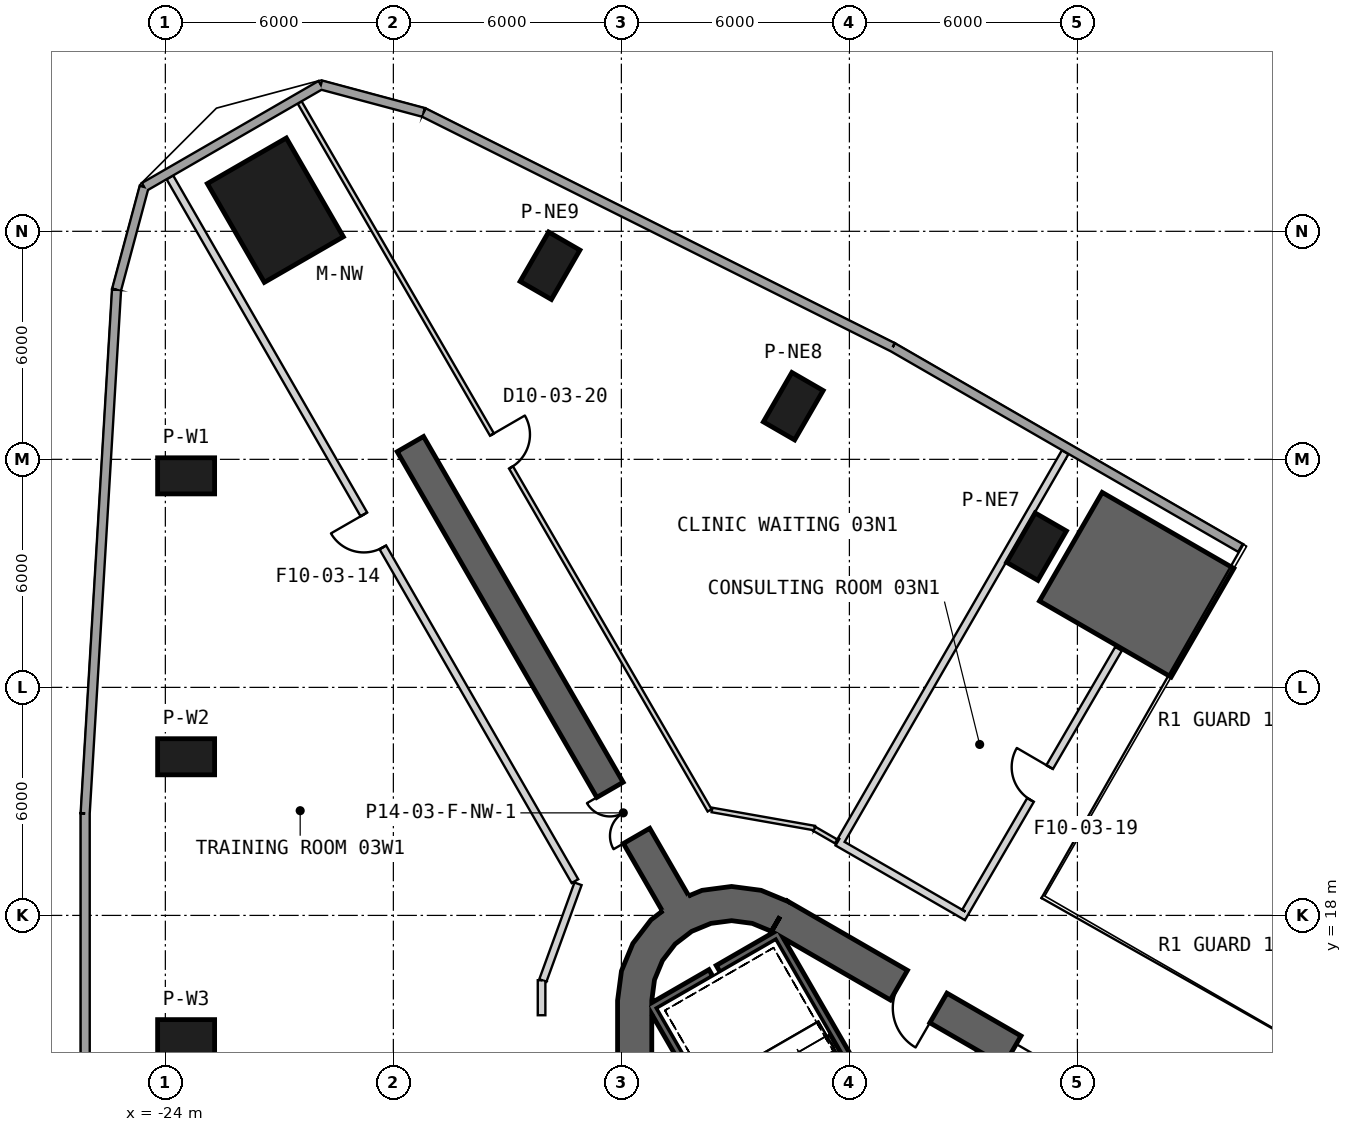
"""IFC4 building model, lengths in metres.
Left out: names, types, materials, properties, quantities, classifications, styles, units other than length and angle.
Written with IfcOpenShell. Run it as: python <this file> out.ifc"""

import sys

from ifc_helpers import new_model, si_unit, direction, frame, frame_2d, origin, origin_2d, place, context, subcontext, project, spatial, polyline, rectangle, outline, extrude, element, fill, save


model = new_model("IFC4")
c1 = context("Model", 3, precision=1e-05, world=origin(), true_north=direction((0.0, 1.0)))
c2 = subcontext(c1, "Body", "Model", "MODEL_VIEW")
j1 = project(units=[si_unit("LENGTHUNIT", "METRE"), si_unit("PLANEANGLEUNIT", "RADIAN")], contexts=[c1])
p1 = place(None, origin())
s1 = spatial("IfcSite", under=j1, at=p1, CompositionType="ELEMENT")
p2 = place(p1, origin())
s2 = spatial("IfcBuilding", under=s1, at=p2, CompositionType="ELEMENT")
p3 = place(p2, frame((0.0, 0.0, 21.5)))
s3 = spatial("IfcBuildingStorey", under=s2, at=p3, CompositionType="ELEMENT", Elevation=21.5)
p4 = place(p3, frame((-21.106, 36.556, 0.0), z_axis=(0.0, 0.0, 1.0), x_axis=(-0.5, 0.866025403784, 0.0)))
e1 = element("IfcColumn", 1, at=p4, inside=s3, PredefinedType="COLUMN", context=c2, shape_type="SweptSolid", body=[
    extrude(rectangle(XDim=3.0, YDim=2.4, at=origin_2d()), origin(), (0.0, 0.0, 1.0), 6.0),
])
for number, where, z_axis, x_axis in (
    (2, (-23.453, 29.566, 0.0), (0.0, 0.0, 1.0), (-1.0, 0.0, 0.0)),
    (3, (-23.453, 22.174, 0.0), (0.0, 0.0, 1.0), (-1.0, 0.0, 0.0)),
    (4, (-23.453, 14.783, 0.0), (0.0, 0.0, 1.0), (-1.0, 0.0, 0.0)),
    (5, (-1.076, 27.703, 0.0), (0.0, 0.0, 1.0), (0.5, 0.866, 0.0)),
    (6, (-7.477, 31.398, 0.0), (0.0, 0.0, 1.0), (0.5, 0.866, 0.0)),
    (7, (-13.878, 35.094, 0.0), (0.0, 0.0, 1.0), (0.5, 0.866, 0.0)),
):
    element("IfcColumn", number, at=place(p3, frame(where, z_axis=z_axis, x_axis=x_axis)), inside=s3, PredefinedType="COLUMN", context=c2, shape_type="SweptSolid", body=[
        extrude(rectangle(XDim=1.5, YDim=0.95, at=origin_2d()), origin(), (0.0, 0.0, 1.0), 6.0),
    ])
p5 = place(p3, frame((19.475, 2.208, 0.0), z_axis=(0.0, 0.0, 1.0), x_axis=(-0.866028369851, 0.499994862586, 0.0)))
e8 = element("IfcWall", 8, at=p5, inside=s3, PredefinedType="SHEAR", context=c2, shape_type="SweptSolid", body=[
    extrude(rectangle(XDim=31.523, YDim=0.9, at=frame_2d((15.762, 0.0))), origin(), (0.0, 0.0, 1.0), 6.0),
])
p6 = place(p5, frame((7.062, 0.0, 0.0)))
e9 = element("IfcOpeningElement", 9, at=p6, cuts=e8, PredefinedType="OPENING", context=c2, shape_type="SweptSolid", body=[
    extrude(rectangle(XDim=1.2, YDim=2.4, at=frame_2d((0.6, 1.2))), frame((0.0, 0.46, 0.0), z_axis=(0.0, -1.0, 0.0), x_axis=(1.0, 0.0, 0.0)), (0.0, 0.0, 1.0), 0.92),
])
p7 = place(p5, frame((9.762, 0.0, 0.0)))
e10 = element("IfcOpeningElement", 10, at=p7, cuts=e8, PredefinedType="OPENING", context=c2, shape_type="SweptSolid", body=[
    extrude(rectangle(XDim=1.2, YDim=2.4, at=frame_2d((0.6, 1.2))), frame((0.0, 0.46, 0.0), z_axis=(0.0, -1.0, 0.0), x_axis=(1.0, 0.0, 0.0)), (0.0, 0.0, 1.0), 0.92),
])
p8 = place(p5, frame((12.462, 0.0, 0.0)))
e11 = element("IfcOpeningElement", 11, at=p8, cuts=e8, PredefinedType="OPENING", context=c2, shape_type="SweptSolid", body=[
    extrude(rectangle(XDim=1.2, YDim=2.4, at=frame_2d((0.6, 1.2))), frame((0.0, 0.46, 0.0), z_axis=(0.0, -1.0, 0.0), x_axis=(1.0, 0.0, 0.0)), (0.0, 0.0, 1.0), 0.92),
])
p9 = place(p5, frame((15.162, 0.0, 0.0)))
e12 = element("IfcOpeningElement", 12, at=p9, cuts=e8, PredefinedType="OPENING", context=c2, shape_type="SweptSolid", body=[
    extrude(rectangle(XDim=1.2, YDim=2.4, at=frame_2d((0.6, 1.2))), frame((0.0, 0.46, 0.0), z_axis=(0.0, -1.0, 0.0), x_axis=(1.0, 0.0, 0.0)), (0.0, 0.0, 1.0), 0.92),
])
p10 = place(p5, frame((17.862, 0.0, 0.0)))
e13 = element("IfcOpeningElement", 13, at=p10, cuts=e8, PredefinedType="OPENING", context=c2, shape_type="SweptSolid", body=[
    extrude(rectangle(XDim=1.2, YDim=2.4, at=frame_2d((0.6, 1.2))), frame((0.0, 0.46, 0.0), z_axis=(0.0, -1.0, 0.0), x_axis=(1.0, 0.0, 0.0)), (0.0, 0.0, 1.0), 0.92),
])
p11 = place(p5, frame((20.562, 0.0, 0.0)))
e14 = element("IfcOpeningElement", 14, at=p11, cuts=e8, PredefinedType="OPENING", context=c2, shape_type="SweptSolid", body=[
    extrude(rectangle(XDim=1.2, YDim=2.4, at=frame_2d((0.6, 1.2))), frame((0.0, 0.46, 0.0), z_axis=(0.0, -1.0, 0.0), x_axis=(1.0, 0.0, 0.0)), (0.0, 0.0, 1.0), 0.92),
])
p12 = place(p5, frame((23.262, 0.0, 0.0)))
e15 = element("IfcOpeningElement", 15, at=p12, cuts=e8, PredefinedType="OPENING", context=c2, shape_type="SweptSolid", body=[
    extrude(rectangle(XDim=1.2, YDim=2.4, at=frame_2d((0.6, 1.2))), frame((0.0, 0.46, 0.0), z_axis=(0.0, -1.0, 0.0), x_axis=(1.0, 0.0, 0.0)), (0.0, 0.0, 1.0), 0.92),
])
p13 = place(p5, frame((3.612, 0.0, 0.0)))
e16 = element("IfcOpeningElement", 16, at=p13, cuts=e8, PredefinedType="OPENING", context=c2, shape_type="SweptSolid", body=[
    extrude(rectangle(XDim=1.2, YDim=2.4, at=frame_2d((0.6, 1.2))), frame((0.0, 0.46, 0.0), z_axis=(0.0, -1.0, 0.0), x_axis=(1.0, 0.0, 0.0)), (0.0, 0.0, 1.0), 0.92),
])
p14 = place(p5, frame((26.712, 0.0, 0.0)))
e17 = element("IfcOpeningElement", 17, at=p14, cuts=e8, PredefinedType="OPENING", context=c2, shape_type="SweptSolid", body=[
    extrude(rectangle(XDim=1.2, YDim=2.4, at=frame_2d((0.6, 1.2))), frame((0.0, 0.46, 0.0), z_axis=(0.0, -1.0, 0.0), x_axis=(1.0, 0.0, 0.0)), (0.0, 0.0, 1.0), 0.92),
])
p15 = place(p3, frame((-11.65, 15.762, 0.0), z_axis=(0.0, 0.0, 1.0), x_axis=(0.0, -1.0, 0.0)))
e18 = element("IfcWall", 18, at=p15, inside=s3, PredefinedType="SHEAR", context=c2, shape_type="SweptSolid", body=[
    extrude(rectangle(XDim=31.523, YDim=0.9, at=frame_2d((15.762, 0.0))), origin(), (0.0, 0.0, 1.0), 6.0),
])
p16 = place(p15, frame((7.062, 0.0, 0.0)))
e19 = element("IfcOpeningElement", 19, at=p16, cuts=e18, PredefinedType="OPENING", context=c2, shape_type="SweptSolid", body=[
    extrude(rectangle(XDim=1.2, YDim=2.4, at=frame_2d((0.6, 1.2))), frame((0.0, 0.46, 0.0), z_axis=(0.0, -1.0, 0.0), x_axis=(1.0, 0.0, 0.0)), (0.0, 0.0, 1.0), 0.92),
])
p17 = place(p15, frame((9.762, 0.0, 0.0)))
e20 = element("IfcOpeningElement", 20, at=p17, cuts=e18, PredefinedType="OPENING", context=c2, shape_type="SweptSolid", body=[
    extrude(rectangle(XDim=1.2, YDim=2.4, at=frame_2d((0.6, 1.2))), frame((0.0, 0.46, 0.0), z_axis=(0.0, -1.0, 0.0), x_axis=(1.0, 0.0, 0.0)), (0.0, 0.0, 1.0), 0.92),
])
p18 = place(p15, frame((12.462, 0.0, 0.0)))
e21 = element("IfcOpeningElement", 21, at=p18, cuts=e18, PredefinedType="OPENING", context=c2, shape_type="SweptSolid", body=[
    extrude(rectangle(XDim=1.2, YDim=2.4, at=frame_2d((0.6, 1.2))), frame((0.0, 0.46, 0.0), z_axis=(0.0, -1.0, 0.0), x_axis=(1.0, 0.0, 0.0)), (0.0, 0.0, 1.0), 0.92),
])
p19 = place(p15, frame((15.162, 0.0, 0.0)))
e22 = element("IfcOpeningElement", 22, at=p19, cuts=e18, PredefinedType="OPENING", context=c2, shape_type="SweptSolid", body=[
    extrude(rectangle(XDim=1.2, YDim=2.4, at=frame_2d((0.6, 1.2))), frame((0.0, 0.46, 0.0), z_axis=(0.0, -1.0, 0.0), x_axis=(1.0, 0.0, 0.0)), (0.0, 0.0, 1.0), 0.92),
])
p20 = place(p15, frame((17.862, 0.0, 0.0)))
e23 = element("IfcOpeningElement", 23, at=p20, cuts=e18, PredefinedType="OPENING", context=c2, shape_type="SweptSolid", body=[
    extrude(rectangle(XDim=1.2, YDim=2.4, at=frame_2d((0.6, 1.2))), frame((0.0, 0.46, 0.0), z_axis=(0.0, -1.0, 0.0), x_axis=(1.0, 0.0, 0.0)), (0.0, 0.0, 1.0), 0.92),
])
p21 = place(p15, frame((20.562, 0.0, 0.0)))
e24 = element("IfcOpeningElement", 24, at=p21, cuts=e18, PredefinedType="OPENING", context=c2, shape_type="SweptSolid", body=[
    extrude(rectangle(XDim=1.2, YDim=2.4, at=frame_2d((0.6, 1.2))), frame((0.0, 0.46, 0.0), z_axis=(0.0, -1.0, 0.0), x_axis=(1.0, 0.0, 0.0)), (0.0, 0.0, 1.0), 0.92),
])
p22 = place(p15, frame((23.262, 0.0, 0.0)))
e25 = element("IfcOpeningElement", 25, at=p22, cuts=e18, PredefinedType="OPENING", context=c2, shape_type="SweptSolid", body=[
    extrude(rectangle(XDim=1.2, YDim=2.4, at=frame_2d((0.6, 1.2))), frame((0.0, 0.46, 0.0), z_axis=(0.0, -1.0, 0.0), x_axis=(1.0, 0.0, 0.0)), (0.0, 0.0, 1.0), 0.92),
])
p23 = place(p15, frame((3.612, 0.0, 0.0)))
e26 = element("IfcOpeningElement", 26, at=p23, cuts=e18, PredefinedType="OPENING", context=c2, shape_type="SweptSolid", body=[
    extrude(rectangle(XDim=1.2, YDim=2.4, at=frame_2d((0.6, 1.2))), frame((0.0, 0.46, 0.0), z_axis=(0.0, -1.0, 0.0), x_axis=(1.0, 0.0, 0.0)), (0.0, 0.0, 1.0), 0.92),
])
p24 = place(p15, frame((26.712, 0.0, 0.0)))
e27 = element("IfcOpeningElement", 27, at=p24, cuts=e18, PredefinedType="OPENING", context=c2, shape_type="SweptSolid", body=[
    extrude(rectangle(XDim=1.2, YDim=2.4, at=frame_2d((0.6, 1.2))), frame((0.0, 0.46, 0.0), z_axis=(0.0, -1.0, 0.0), x_axis=(1.0, 0.0, 0.0)), (0.0, 0.0, 1.0), 0.92),
])
p25 = place(p3, origin())
e28 = element("IfcWall", 28, at=p25, inside=s3, PredefinedType="SHEAR", context=c2, shape_type="SweptSolid", body=[
    extrude(outline(polyline([(-7.6, 18.36), (-8.323, 18.659), (-9.1, 18.762), (-9.876, 18.659), (-10.6, 18.36), (-11.221, 17.883), (-11.698, 17.262), (-11.998, 16.538), (-12.1, 15.762), (-11.2, 15.762), (-11.128, 16.305), (-10.919, 16.812), (-10.585, 17.247), (-10.15, 17.58), (-9.644, 17.79), (-9.1, 17.862), (-8.556, 17.79), (-8.05, 17.58), (-7.6, 18.36)])), origin(), (0.0, 0.0, 1.0), 6.0),
])
p26 = place(p3, frame((-10.575, 18.316, 0.0), z_axis=(0.0, 0.0, 1.0), x_axis=(-0.499996575515, 0.866027380903, 0.0)))
e29 = element("IfcWall", 29, at=p26, inside=s3, PredefinedType="SHEAR", context=c2, shape_type="SweptSolid", body=[
    extrude(rectangle(XDim=13.954, YDim=0.8, at=frame_2d((6.977, 0.0))), origin(), (0.0, 0.0, 1.0), 6.0),
])
p27 = place(p26, frame((2.05, 0.0, 0.0)))
e30 = element("IfcOpeningElement", 30, at=p27, cuts=e29, PredefinedType="OPENING", context=c2, shape_type="SweptSolid", body=[
    extrude(rectangle(XDim=1.4, YDim=2.4, at=frame_2d((0.7, 1.2))), frame((0.0, 0.41, 0.0), z_axis=(0.0, -1.0, 0.0), x_axis=(1.0, 0.0, 0.0)), (0.0, 0.0, 1.0), 0.82),
])
p28 = place(p3, origin())
e31 = element("IfcWall", 31, at=p28, inside=s3, PredefinedType="SHEAR", context=c2, shape_type="SweptSolid", body=[
    extrude(outline(polyline([(4.116, 27.13), (0.652, 29.13), (-0.998, 26.272), (2.467, 24.272), (4.116, 27.13)])), origin(), (0.0, 0.0, 1.0), 6.0),
])
p29 = place(p3, frame((4.29, 27.67, 0.0), z_axis=(0.0, 0.0, 1.0), x_axis=(-0.866062075984, 0.499936476508, 0.0)))
e32 = element("IfcWall", 32, at=p29, inside=s3, PredefinedType="SOLIDWALL", context=c2, shape_type="SweptSolid", body=[
    extrude(rectangle(XDim=10.566, YDim=0.24, at=frame_2d((5.283, 0.0))), origin(), (0.0, 0.0, 1.0), 5.7),
])
p30 = place(p3, frame((-4.861, 32.952, 0.0), z_axis=(0.0, 0.0, 1.0), x_axis=(-0.894285628533, 0.447496608478, 0.0)))
e33 = element("IfcWall", 33, at=p30, inside=s3, PredefinedType="SOLIDWALL", context=c2, shape_type="SweptSolid", body=[
    extrude(rectangle(XDim=13.801, YDim=0.24, at=frame_2d((6.901, 0.0))), origin(), (0.0, 0.0, 1.0), 5.7),
])
p31 = place(p3, frame((-17.203, 39.128, 0.0), z_axis=(0.0, 0.0, 1.0), x_axis=(-0.965923146675, 0.25882904535, 0.0)))
e34 = element("IfcWall", 34, at=p31, inside=s3, PredefinedType="SOLIDWALL", context=c2, shape_type="SweptSolid", body=[
    extrude(rectangle(XDim=2.801, YDim=0.24, at=frame_2d((1.4, 0.0))), origin(), (0.0, 0.0, 1.0), 5.7),
])
p32 = place(p3, frame((-19.908, 39.853, 0.0), z_axis=(0.0, 0.0, 1.0), x_axis=(-0.866010734295, -0.500025407441, 0.0)))
e35 = element("IfcWall", 35, at=p32, inside=s3, PredefinedType="SOLIDWALL", context=c2, shape_type="SweptSolid", body=[
    extrude(rectangle(XDim=5.371, YDim=0.24, at=frame_2d((2.686, 0.0))), origin(), (0.0, 0.0, 1.0), 5.7),
])
p33 = place(p3, frame((-24.56, 37.167, 0.0), z_axis=(0.0, 0.0, 1.0), x_axis=(-0.258850842196, -0.965917305723, 0.0)))
e36 = element("IfcWall", 36, at=p33, inside=s3, PredefinedType="SOLIDWALL", context=c2, shape_type="SweptSolid", body=[
    extrude(rectangle(XDim=2.8, YDim=0.24, at=frame_2d((1.4, 0.0))), origin(), (0.0, 0.0, 1.0), 5.7),
])
p34 = place(p3, frame((-25.284, 34.462, 0.0), z_axis=(0.0, 0.0, 1.0), x_axis=(-0.059807686217, -0.998209918138, 0.0)))
e37 = element("IfcWall", 37, at=p34, inside=s3, PredefinedType="SOLIDWALL", context=c2, shape_type="SweptSolid", body=[
    extrude(rectangle(XDim=13.802, YDim=0.24, at=frame_2d((6.901, 0.0))), origin(), (0.0, 0.0, 1.0), 5.7),
])
p35 = place(p3, frame((-26.11, 20.685, 0.0), z_axis=(0.0, 0.0, 1.0), x_axis=(6.9319284e-05, -0.999999997597, 0.0)))
e38 = element("IfcWall", 38, at=p35, inside=s3, PredefinedType="SOLIDWALL", context=c2, shape_type="SweptSolid", body=[
    extrude(rectangle(XDim=10.566, YDim=0.24, at=frame_2d((5.283, 0.0))), origin(), (0.0, 0.0, 1.0), 5.7),
])
p36 = place(p3, frame((-4.158, 11.696, 0.0), z_axis=(0.0, 0.0, 1.0), x_axis=(0.508018930956, 0.861345903683, 0.0)))
e39 = element("IfcWall", 39, at=p36, inside=s3, PredefinedType="PLUMBINGWALL", context=c2, shape_type="SweptSolid", body=[
    extrude(rectangle(XDim=3.15, YDim=0.2, at=frame_2d((1.575, 0.0))), origin(), (0.0, 0.0, 1.0), 5.7),
])
p37 = place(p3, frame((-11.245, 15.678, -0.3), z_axis=(0.0, 0.0, 1.0), x_axis=(0.499977274689, -0.866038523851, 0.0)))
e40 = element("IfcWall", 40, at=p37, inside=s3, PredefinedType="SHEAR", context=c2, shape_type="SweptSolid", body=[
    extrude(rectangle(XDim=8.1, YDim=0.2, at=frame_2d((4.05, 0.0))), origin(), (0.0, 0.0, 1.0), 6.0),
])
p38 = place(p3, frame((-7.818, 17.541, -0.3), z_axis=(0.0, 0.0, 1.0), x_axis=(-0.866088799389, -0.499890179513, 0.0)))
e41 = element("IfcWall", 41, at=p38, inside=s3, PredefinedType="SHEAR", context=c2, shape_type="SweptSolid", body=[
    extrude(rectangle(XDim=1.89, YDim=0.2, at=frame_2d((0.945, 0.0))), origin(), (0.0, 0.0, 1.0), 6.0),
])
p39 = place(p3, frame((-9.645, 16.486, -0.3), z_axis=(0.0, 0.0, 1.0), x_axis=(-0.866038843867, -0.499976720371, 0.0)))
e42 = element("IfcWall", 42, at=p39, inside=s3, PredefinedType="SHEAR", context=c2, shape_type="SweptSolid", body=[
    extrude(rectangle(XDim=1.69, YDim=0.2, at=frame_2d((0.845, 0.0))), origin(), (0.0, 0.0, 1.0), 6.0),
])
p40 = place(p3, frame((-7.854, 17.405, -0.3), z_axis=(0.0, 0.0, 1.0), x_axis=(0.499997992926, -0.866026562566, 0.0)))
e43 = element("IfcWall", 43, at=p40, inside=s3, PredefinedType="SHEAR", context=c2, shape_type="SweptSolid", body=[
    extrude(rectangle(XDim=7.9, YDim=0.2, at=frame_2d((3.95, 0.0))), origin(), (0.0, 0.0, 1.0), 6.0),
])
p41 = place(p3, frame((-14.1, 16.294, 0.0), z_axis=(0.0, 0.0, 1.0), x_axis=(0.0, -1.0, 0.0)))
e44 = element("IfcWall", 44, at=p41, inside=s3, PredefinedType="PARTITIONING", context=c2, shape_type="SweptSolid", body=[
    extrude(rectangle(XDim=0.92, YDim=0.2, at=frame_2d((0.46, 0.0))), origin(), (0.0, 0.0, 1.0), 5.7),
])
p42 = place(p3, frame((-13.141, 18.831, 0.0), z_axis=(0.0, 0.0, 1.0), x_axis=(-0.34184444978, -0.939756549408, 0.0)))
e45 = element("IfcWall", 45, at=p42, inside=s3, PredefinedType="PARTITIONING", context=c2, shape_type="SweptSolid", body=[
    extrude(rectangle(XDim=2.707, YDim=0.2, at=frame_2d((1.354, 0.0))), origin(), (0.0, 0.0, 1.0), 4.78),
])
p43 = place(p3, frame((-13.222, 18.901, 0.0), z_axis=(0.0, 0.0, 1.0), x_axis=(-0.498838585436, 0.866694909227, 0.0)))
e46 = element("IfcWall", 46, at=p43, inside=s3, PredefinedType="PARTITIONING", context=c2, shape_type="SweptSolid", body=[
    extrude(rectangle(XDim=21.368, YDim=0.2, at=frame_2d((10.684, 0.0))), origin(), (0.0, 0.0, 1.0), 5.7),
])
p44 = place(p43, frame((10.134, 0.0, 0.0)))
e47 = element("IfcOpeningElement", 47, at=p44, cuts=e46, PredefinedType="OPENING", context=c2, shape_type="SweptSolid", body=[
    extrude(rectangle(XDim=1.0, YDim=2.1, at=frame_2d((0.5, 1.05))), frame((0.0, 0.11, 0.0), z_axis=(0.0, -1.0, 0.0), x_axis=(1.0, 0.0, 0.0)), (0.0, 0.0, 1.0), 0.22),
])
p45 = place(p3, frame((-2.909, 17.962, 0.0), z_axis=(0.0, 0.0, 1.0), x_axis=(-0.866156637233, 0.499772628079, 0.0)))
e48 = element("IfcWall", 48, at=p45, inside=s3, PredefinedType="PARTITIONING", context=c2, shape_type="SweptSolid", body=[
    extrude(rectangle(XDim=3.931, YDim=0.2, at=frame_2d((1.966, 0.0))), origin(), (0.0, 0.0, 1.0), 4.88),
])
p46 = place(p3, frame((-2.945, 18.098, 0.0), z_axis=(0.0, 0.0, 1.0), x_axis=(0.503235430028, 0.864149351654, 0.0)))
e49 = element("IfcWall", 49, at=p46, inside=s3, PredefinedType="PARTITIONING", context=c2, shape_type="SweptSolid", body=[
    extrude(rectangle(XDim=8.002, YDim=0.2, at=frame_2d((4.001, 0.0))), origin(), (0.0, 0.0, 1.0), 5.17),
])
p47 = place(p46, frame((3.402, 0.0, 0.0)))
e50 = element("IfcOpeningElement", 50, at=p47, cuts=e49, PredefinedType="OPENING", context=c2, shape_type="SweptSolid", body=[
    extrude(rectangle(XDim=1.0, YDim=2.1, at=frame_2d((0.5, 1.05))), frame((0.0, 0.11, 0.0), z_axis=(0.0, -1.0, 0.0), x_axis=(1.0, 0.0, 0.0)), (0.0, 0.0, 1.0), 0.22),
])
p48 = place(p3, frame((-20.467, 39.392, 0.0), z_axis=(0.0, 0.0, 1.0), x_axis=(0.501152950446, -0.865358723455, 0.0)))
e51 = element("IfcWall", 51, at=p48, inside=s3, PredefinedType="PARTITIONING", context=c2, shape_type="SweptSolid", body=[
    extrude(rectangle(XDim=21.527, YDim=0.12, at=frame_2d((10.763, 0.0))), origin(), (0.0, 0.0, 1.0), 5.7),
])
p49 = place(p48, frame((10.099, 0.0, 0.0)))
e52 = element("IfcOpeningElement", 52, at=p49, cuts=e51, PredefinedType="OPENING", context=c2, shape_type="SweptSolid", body=[
    extrude(rectangle(XDim=1.0, YDim=2.1, at=frame_2d((0.5, 1.05))), frame((0.0, 0.07, 0.0), z_axis=(0.0, -1.0, 0.0), x_axis=(1.0, 0.0, 0.0)), (0.0, 0.0, 1.0), 0.14),
])
p50 = place(p3, frame((-6.915, 20.297, 0.0), z_axis=(0.0, 0.0, 1.0), x_axis=(-0.984779973114, 0.173805651674, 0.0)))
e53 = element("IfcWall", 53, at=p50, inside=s3, PredefinedType="PARTITIONING", context=c2, shape_type="SweptSolid", body=[
    extrude(rectangle(XDim=2.742, YDim=0.12, at=frame_2d((1.371, 0.0))), origin(), (0.0, 0.0, 1.0), 4.78),
])
p51 = place(p3, frame((-6.349, 19.947, 0.0), z_axis=(0.0, 0.0, 1.0), x_axis=(-0.865964461276, 0.500105540669, 0.0)))
e54 = element("IfcWall", 54, at=p51, inside=s3, PredefinedType="PARTITIONING", context=c2, shape_type="SweptSolid", body=[
    extrude(rectangle(XDim=0.662, YDim=0.12, at=frame_2d((0.331, 0.0))), origin(), (0.0, 0.0, 1.0), 5.7),
])
p52 = place(p3, frame((-6.212, 19.983, 0.0), z_axis=(0.0, 0.0, 1.0), x_axis=(0.499938894435, 0.866060680225, 0.0)))
e55 = element("IfcWall", 55, at=p52, inside=s3, PredefinedType="PARTITIONING", context=c2, shape_type="SweptSolid", body=[
    extrude(rectangle(XDim=11.782, YDim=0.2, at=frame_2d((5.891, 0.0))), origin(), (0.0, 0.0, 1.0), 4.88),
])
p53 = place(p44, origin())
e56 = element("IfcDoor", 56, at=p53, inside=s3, OperationType="SINGLE_SWING_RIGHT", PredefinedType="USERDEFINED", context=c2, shape_type="SweptSolid", body=[
    extrude(rectangle(XDim=1.0, YDim=2.1, at=frame_2d((0.5, 1.05))), frame((0.0, 0.025, 0.0), z_axis=(0.0, -1.0, 0.0), x_axis=(1.0, 0.0, 0.0)), (0.0, 0.0, 1.0), 0.05),
])
fill(e47, e56)
p54 = place(p47, origin())
e57 = element("IfcDoor", 57, at=p54, inside=s3, OperationType="SINGLE_SWING_RIGHT", PredefinedType="USERDEFINED", context=c2, shape_type="SweptSolid", body=[
    extrude(rectangle(XDim=1.0, YDim=2.1, at=frame_2d((0.5, 1.05))), frame((0.0, 0.025, 0.0), z_axis=(0.0, -1.0, 0.0), x_axis=(1.0, 0.0, 0.0)), (0.0, 0.0, 1.0), 0.05),
])
fill(e50, e57)
p55 = place(p49, origin())
e58 = element("IfcDoor", 58, at=p55, inside=s3, OperationType="SINGLE_SWING_LEFT", PredefinedType="NOTDEFINED", context=c2, shape_type="SweptSolid", body=[
    extrude(rectangle(XDim=1.0, YDim=2.1, at=frame_2d((0.5, 1.05))), frame((0.0, 0.025, 0.0), z_axis=(0.0, -1.0, 0.0), x_axis=(1.0, 0.0, 0.0)), (0.0, 0.0, 1.0), 0.05),
])
fill(e52, e58)
p56 = place(p12, origin())
e59 = element("IfcDoor", 59, at=p56, inside=s3, OperationType="SLIDING_TO_LEFT", PredefinedType="USERDEFINED", context=c2, shape_type="SweptSolid", body=[
    extrude(rectangle(XDim=1.2, YDim=2.4, at=frame_2d((0.6, 1.2))), frame((0.0, 0.025, 0.0), z_axis=(0.0, -1.0, 0.0), x_axis=(1.0, 0.0, 0.0)), (0.0, 0.0, 1.0), 0.05),
])
fill(e15, e59)
p57 = place(p14, origin())
e60 = element("IfcDoor", 60, at=p57, inside=s3, OperationType="SINGLE_SWING_LEFT", PredefinedType="USERDEFINED", context=c2, shape_type="SweptSolid", body=[
    extrude(rectangle(XDim=1.2, YDim=2.4, at=frame_2d((0.6, 1.2))), frame((0.0, 0.025, 0.0), z_axis=(0.0, -1.0, 0.0), x_axis=(1.0, 0.0, 0.0)), (0.0, 0.0, 1.0), 0.05),
])
fill(e17, e60)
p58 = place(p27, origin())
e61 = element("IfcDoor", 61, at=p58, inside=s3, OperationType="DOUBLE_DOOR_SINGLE_SWING", PredefinedType="NOTDEFINED", context=c2, shape_type="SweptSolid", body=[
    extrude(rectangle(XDim=1.4, YDim=2.4, at=frame_2d((0.7, 1.2))), frame((0.0, 0.025, 0.0), z_axis=(0.0, -1.0, 0.0), x_axis=(1.0, 0.0, 0.0)), (0.0, 0.0, 1.0), 0.05),
])
fill(e30, e61)
save(model, sys.argv[1])
